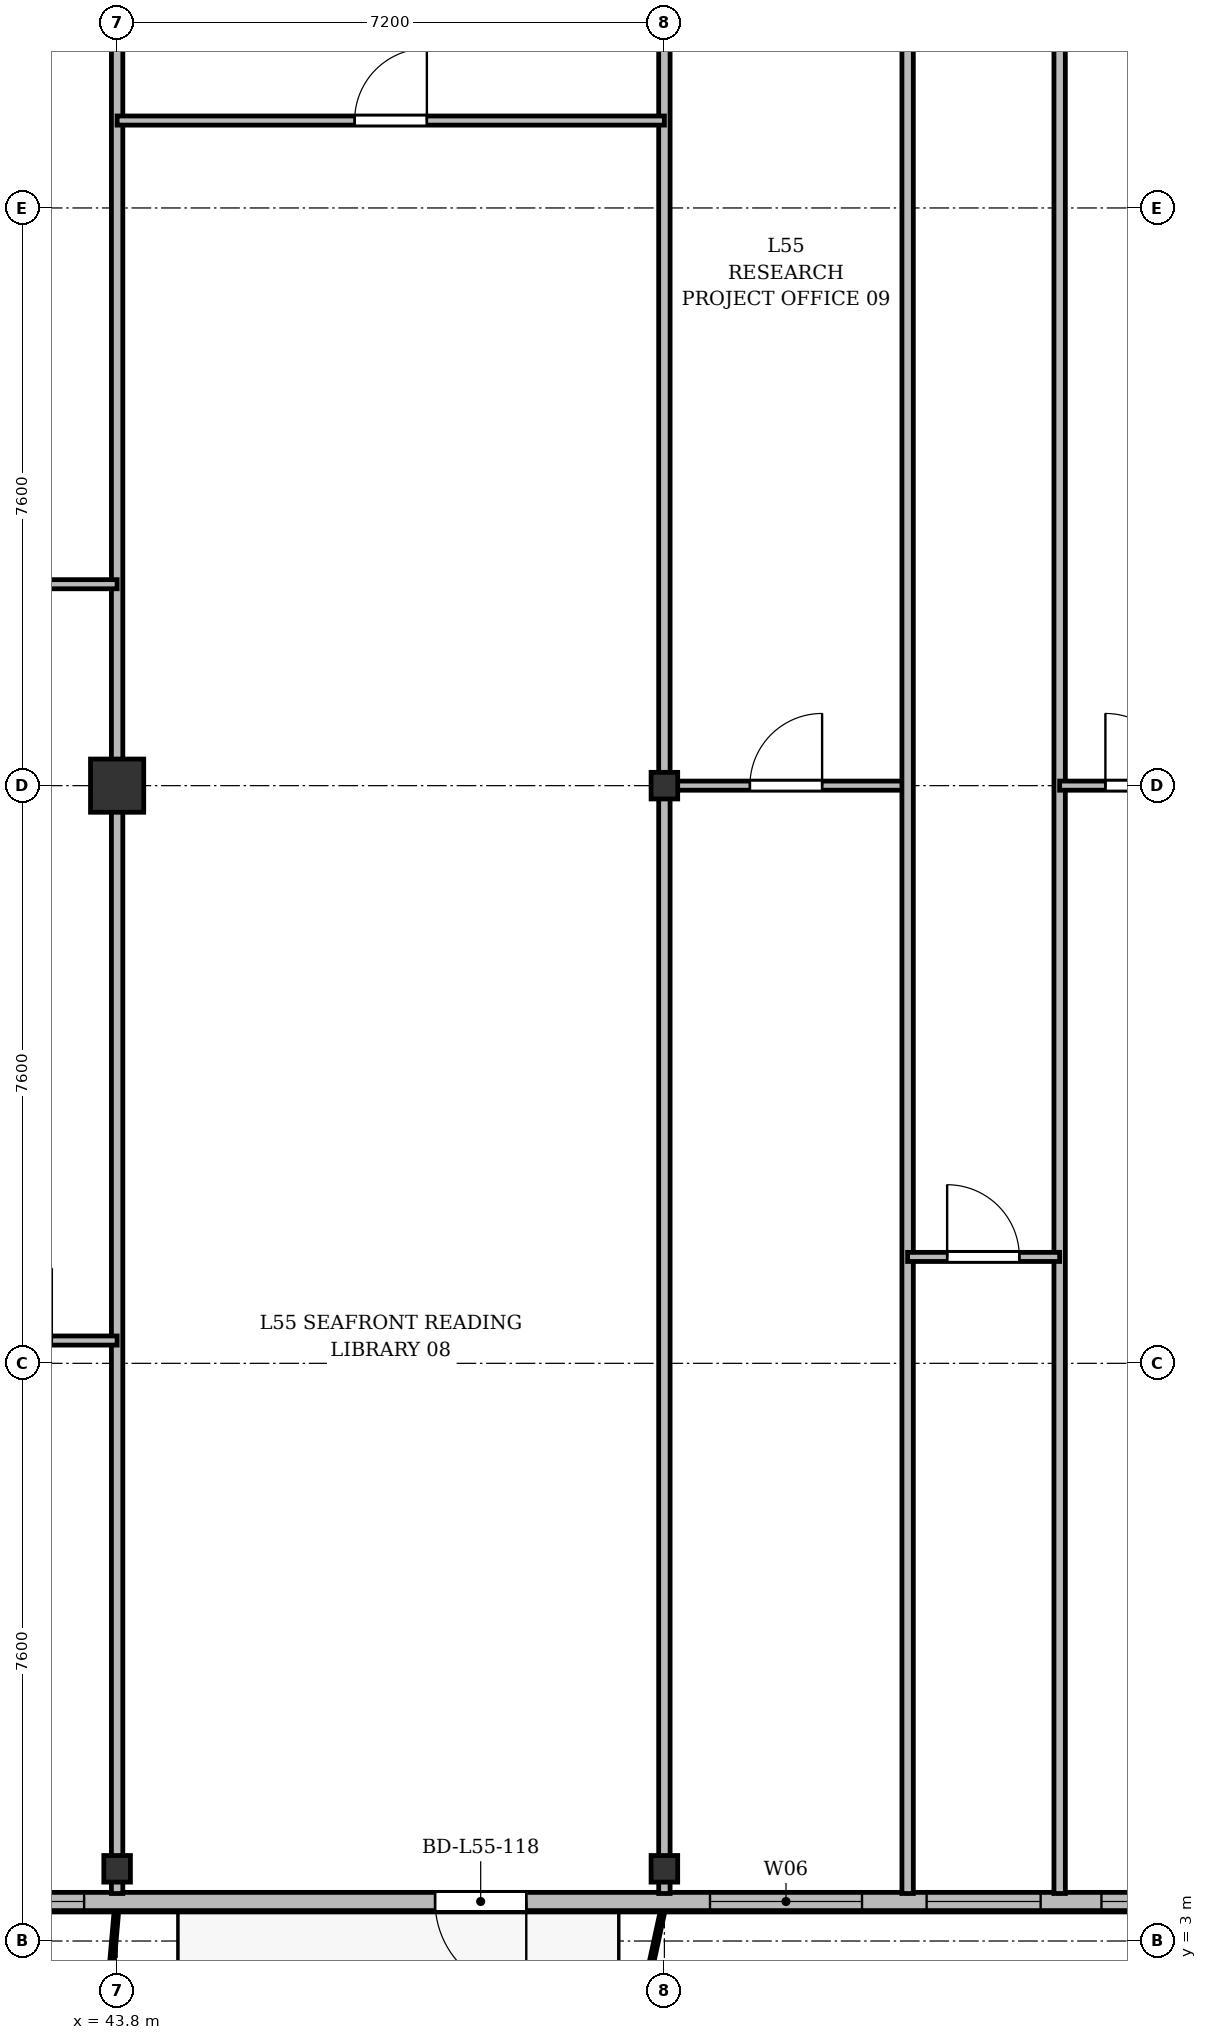
"""IFC4 building model, lengths in metres.
Left out: names, types, materials, properties, quantities, classifications, styles, units other than length and angle.
Written with IfcOpenShell. Run it as: python <this file> out.ifc"""

import sys

from ifc_helpers import new_model, si_unit, direction, frame, frame_2d, origin, origin_2d, place, context, subcontext, project, spatial, rectangle, i_section, extrude, source, transform, mapped, element, fill, save


model = new_model("IFC4")
c1 = context("Model", 3, precision=1e-05, world=origin(), true_north=direction((0.0, 1.0)))
c2 = subcontext(c1, "Body", "Model", "MODEL_VIEW")
j1 = project(units=[si_unit("LENGTHUNIT", "METRE"), si_unit("PLANEANGLEUNIT", "RADIAN")], contexts=[c1])
p1 = place(None, origin())
s1 = spatial("IfcSite", under=j1, at=p1, CompositionType="ELEMENT")
p2 = place(p1, origin())
s2 = spatial("IfcBuilding", under=s1, at=p2, CompositionType="ELEMENT")
p3 = place(p2, frame((0.0, 0.0, 212.1)))
s3 = spatial("IfcBuildingStorey", under=s2, at=p3, CompositionType="ELEMENT", Elevation=212.1)
m1 = source(origin(), c2, "Body", "SweptSolid", [
    extrude(i_section(OverallWidth=0.35, OverallDepth=0.35, WebThickness=0.018, FlangeThickness=0.028, at=origin_2d()), origin(), (0.0, 0.0, 1.0), 3.6),
])
p4 = place(p3, frame((43.8, 3.95, 0.0), z_axis=(0.0, 0.0, 1.0), x_axis=(1.0, 0.0, 0.0)))
e1 = element("IfcColumn", 1, at=p4, inside=s3, PredefinedType="COLUMN", context=c2, shape_type="MappedRepresentation", body=[
    mapped(m1, transform((0.0, 0.0, 0.0), x_axis=(1.0, 0.0, 0.0), y_axis=(0.0, 1.0, 0.0), z_axis=(0.0, 0.0, 1.0), scale=1.0)),
])
m2 = source(origin(), c2, "Body", "SweptSolid", [
    extrude(rectangle(XDim=0.7, YDim=0.7, at=origin_2d()), origin(), (0.0, 0.0, 1.0), 3.6),
])
p5 = place(p3, frame((43.8, 18.2, 0.0), z_axis=(0.0, 0.0, 1.0), x_axis=(1.0, 0.0, 0.0)))
e2 = element("IfcColumn", 2, at=p5, inside=s3, PredefinedType="COLUMN", context=c2, shape_type="MappedRepresentation", body=[
    mapped(m2, transform((0.0, 0.0, 0.0), x_axis=(1.0, 0.0, 0.0), y_axis=(0.0, 1.0, 0.0), z_axis=(0.0, 0.0, 1.0), scale=1.0)),
])
for number, where, z_axis, x_axis in (
    (3, (51.0, 3.95, 0.0), (0.0, 0.0, 1.0), (1.0, 0.0, 0.0)),
    (4, (51.0, 18.2, 0.0), (0.0, 0.0, 1.0), (1.0, 0.0, 0.0)),
):
    element("IfcColumn", number, at=place(p3, frame(where, z_axis=z_axis, x_axis=x_axis)), inside=s3, PredefinedType="COLUMN", context=c2, shape_type="MappedRepresentation", body=[
        mapped(m1, transform((0.0, 0.0, 0.0), x_axis=(1.0, 0.0, 0.0), y_axis=(0.0, 1.0, 0.0), z_axis=(0.0, 0.0, 1.0), scale=1.0)),
    ])
p6 = place(p3, frame((63.4, 3.52, 0.0), z_axis=(0.0, 0.0, 1.0), x_axis=(-1.0, 0.0, 0.0)))
e5 = element("IfcWall", 5, at=p6, inside=s3, PredefinedType="SOLIDWALL", context=c2, shape_type="SweptSolid", body=[
    extrude(rectangle(XDim=52.4, YDim=0.24, at=frame_2d((26.2, 0.0))), origin(), (0.0, 0.0, 1.0), 3.36),
])
p7 = place(p6, frame((1.445, 0.0, 0.9)))
e6 = element("IfcOpeningElement", 6, at=p7, cuts=e5, PredefinedType="OPENING", context=c2, shape_type="SweptSolid", body=[
    extrude(rectangle(XDim=1.8, YDim=1.8, at=frame_2d((0.9, 0.9))), frame((0.0, 0.13, 0.0), z_axis=(0.0, -1.0, 0.0), x_axis=(1.0, 0.0, 0.0)), (0.0, 0.0, 1.0), 0.26),
])
p8 = place(p6, frame((5.15, 0.0, 0.9)))
e7 = element("IfcOpeningElement", 7, at=p8, cuts=e5, PredefinedType="OPENING", context=c2, shape_type="SweptSolid", body=[
    extrude(rectangle(XDim=1.5, YDim=1.75, at=frame_2d((0.75, 0.875))), frame((0.0, 0.13, 0.0), z_axis=(0.0, -1.0, 0.0), x_axis=(1.0, 0.0, 0.0)), (0.0, 0.0, 1.0), 0.26),
])
p9 = place(p6, frame((7.45, 0.0, 0.9)))
e8 = element("IfcOpeningElement", 8, at=p9, cuts=e5, PredefinedType="OPENING", context=c2, shape_type="SweptSolid", body=[
    extrude(rectangle(XDim=1.5, YDim=1.75, at=frame_2d((0.75, 0.875))), frame((0.0, 0.13, 0.0), z_axis=(0.0, -1.0, 0.0), x_axis=(1.0, 0.0, 0.0)), (0.0, 0.0, 1.0), 0.26),
])
p10 = place(p6, frame((9.8, 0.0, 0.9)))
e9 = element("IfcOpeningElement", 9, at=p10, cuts=e5, PredefinedType="OPENING", context=c2, shape_type="SweptSolid", body=[
    extrude(rectangle(XDim=2.0, YDim=1.95, at=frame_2d((1.0, 0.975))), frame((0.0, 0.13, 0.0), z_axis=(0.0, -1.0, 0.0), x_axis=(1.0, 0.0, 0.0)), (0.0, 0.0, 1.0), 0.26),
])
p11 = place(p6, frame((14.217, 0.0, 0.0)))
e10 = element("IfcOpeningElement", 10, at=p11, cuts=e5, PredefinedType="OPENING", context=c2, shape_type="SweptSolid", body=[
    extrude(rectangle(XDim=1.2, YDim=2.2, at=frame_2d((0.6, 1.1))), frame((0.0, 0.13, 0.0), z_axis=(0.0, -1.0, 0.0), x_axis=(1.0, 0.0, 0.0)), (0.0, 0.0, 1.0), 0.26),
])
p12 = place(p6, frame((20.034, 0.0, 0.9)))
e11 = element("IfcOpeningElement", 11, at=p12, cuts=e5, PredefinedType="OPENING", context=c2, shape_type="SweptSolid", body=[
    extrude(rectangle(XDim=1.8, YDim=1.8, at=frame_2d((0.9, 0.9))), frame((0.0, 0.13, 0.0), z_axis=(0.0, -1.0, 0.0), x_axis=(1.0, 0.0, 0.0)), (0.0, 0.0, 1.0), 0.26),
])
p13 = place(p6, frame((22.5, 0.0, 0.9)))
e12 = element("IfcOpeningElement", 12, at=p13, cuts=e5, PredefinedType="OPENING", context=c2, shape_type="SweptSolid", body=[
    extrude(rectangle(XDim=2.2, YDim=1.8, at=frame_2d((1.1, 0.9))), frame((0.0, 0.13, 0.0), z_axis=(0.0, -1.0, 0.0), x_axis=(1.0, 0.0, 0.0)), (0.0, 0.0, 1.0), 0.26),
])
p14 = place(p6, frame((25.517, 0.0, 0.9)))
e13 = element("IfcOpeningElement", 13, at=p14, cuts=e5, PredefinedType="OPENING", context=c2, shape_type="SweptSolid", body=[
    extrude(rectangle(XDim=1.5, YDim=1.75, at=frame_2d((0.75, 0.875))), frame((0.0, 0.13, 0.0), z_axis=(0.0, -1.0, 0.0), x_axis=(1.0, 0.0, 0.0)), (0.0, 0.0, 1.0), 0.26),
])
p15 = place(p6, frame((29.2, 0.0, 0.9)))
e14 = element("IfcOpeningElement", 14, at=p15, cuts=e5, PredefinedType="OPENING", context=c2, shape_type="SweptSolid", body=[
    extrude(rectangle(XDim=2.0, YDim=1.95, at=frame_2d((1.0, 0.975))), frame((0.0, 0.13, 0.0), z_axis=(0.0, -1.0, 0.0), x_axis=(1.0, 0.0, 0.0)), (0.0, 0.0, 1.0), 0.26),
])
p16 = place(p6, frame((33.175, 0.0, 0.9)))
e15 = element("IfcOpeningElement", 15, at=p16, cuts=e5, PredefinedType="OPENING", context=c2, shape_type="SweptSolid", body=[
    extrude(rectangle(XDim=1.65, YDim=1.85, at=frame_2d((0.825, 0.925))), frame((0.0, 0.13, 0.0), z_axis=(0.0, -1.0, 0.0), x_axis=(1.0, 0.0, 0.0)), (0.0, 0.0, 1.0), 0.26),
])
p17 = place(p6, frame((35.5, 0.0, 0.9)))
e16 = element("IfcOpeningElement", 16, at=p17, cuts=e5, PredefinedType="OPENING", context=c2, shape_type="SweptSolid", body=[
    extrude(rectangle(XDim=1.8, YDim=1.8, at=frame_2d((0.9, 0.9))), frame((0.0, 0.13, 0.0), z_axis=(0.0, -1.0, 0.0), x_axis=(1.0, 0.0, 0.0)), (0.0, 0.0, 1.0), 0.26),
])
p18 = place(p6, frame((38.05, 0.0, 0.9)))
e17 = element("IfcOpeningElement", 17, at=p18, cuts=e5, PredefinedType="OPENING", context=c2, shape_type="SweptSolid", body=[
    extrude(rectangle(XDim=1.5, YDim=1.75, at=frame_2d((0.75, 0.875))), frame((0.0, 0.13, 0.0), z_axis=(0.0, -1.0, 0.0), x_axis=(1.0, 0.0, 0.0)), (0.0, 0.0, 1.0), 0.26),
])
p19 = place(p6, frame((41.456, 0.0, 0.0)))
e18 = element("IfcOpeningElement", 18, at=p19, cuts=e5, PredefinedType="OPENING", context=c2, shape_type="SweptSolid", body=[
    extrude(rectangle(XDim=1.2, YDim=2.2, at=frame_2d((0.6, 1.1))), frame((0.0, 0.13, 0.0), z_axis=(0.0, -1.0, 0.0), x_axis=(1.0, 0.0, 0.0)), (0.0, 0.0, 1.0), 0.26),
])
p20 = place(p6, frame((43.45, 0.0, 0.9)))
e19 = element("IfcOpeningElement", 19, at=p20, cuts=e5, PredefinedType="OPENING", context=c2, shape_type="SweptSolid", body=[
    extrude(rectangle(XDim=1.5, YDim=1.75, at=frame_2d((0.75, 0.875))), frame((0.0, 0.13, 0.0), z_axis=(0.0, -1.0, 0.0), x_axis=(1.0, 0.0, 0.0)), (0.0, 0.0, 1.0), 0.26),
])
p21 = place(p6, frame((45.675, 0.0, 0.9)))
e20 = element("IfcOpeningElement", 20, at=p21, cuts=e5, PredefinedType="OPENING", context=c2, shape_type="SweptSolid", body=[
    extrude(rectangle(XDim=1.65, YDim=1.85, at=frame_2d((0.825, 0.925))), frame((0.0, 0.13, 0.0), z_axis=(0.0, -1.0, 0.0), x_axis=(1.0, 0.0, 0.0)), (0.0, 0.0, 1.0), 0.26),
])
p22 = place(p6, frame((49.155, 0.0, 0.9)))
e21 = element("IfcOpeningElement", 21, at=p22, cuts=e5, PredefinedType="OPENING", context=c2, shape_type="SweptSolid", body=[
    extrude(rectangle(XDim=1.8, YDim=1.8, at=frame_2d((0.9, 0.9))), frame((0.0, 0.13, 0.0), z_axis=(0.0, -1.0, 0.0), x_axis=(1.0, 0.0, 0.0)), (0.0, 0.0, 1.0), 0.26),
])
for number, where, z_axis, x_axis in (
    (22, (43.8, 3.625, 0.0), (0.0, 0.0, 1.0), (0.0, 1.0, 0.0)),
    (23, (51.0, 3.625, 0.0), (0.0, 0.0, 1.0), (0.0, 1.0, 0.0)),
):
    element("IfcWall", number, at=place(p3, frame(where, z_axis=z_axis, x_axis=x_axis)), inside=s3, PredefinedType="PARTITIONING", context=c2, shape_type="SweptSolid", body=[
        extrude(rectangle(XDim=27.175, YDim=0.15, at=frame_2d((13.587, 0.0))), origin(), (0.0, 0.0, 1.0), 2.86),
    ])
p23 = place(p3, frame((35.8, 20.85, 0.0), z_axis=(0.0, 0.0, 1.0), x_axis=(1.0, 0.0, 0.0)))
e24 = element("IfcWall", 24, at=p23, inside=s3, PredefinedType="PARTITIONING", context=c2, shape_type="SweptSolid", body=[
    extrude(rectangle(XDim=8.0, YDim=0.12, at=frame_2d((4.0, 0.0))), origin(), (0.0, 0.0, 1.0), 2.86),
])
p24 = place(p23, frame((3.525, 0.0, 0.0)))
e25 = element("IfcOpeningElement", 25, at=p24, cuts=e24, PredefinedType="OPENING", context=c2, shape_type="SweptSolid", body=[
    extrude(rectangle(XDim=0.95, YDim=2.15, at=frame_2d((0.475, 1.075))), frame((0.0, 0.07, 0.0), z_axis=(0.0, -1.0, 0.0), x_axis=(1.0, 0.0, 0.0)), (0.0, 0.0, 1.0), 0.14),
])
p25 = place(p3, frame((41.133, 10.9, 0.0), z_axis=(0.0, 0.0, 1.0), x_axis=(1.0, 0.0, 0.0)))
e26 = element("IfcWall", 26, at=p25, inside=s3, PredefinedType="PARTITIONING", context=c2, shape_type="SweptSolid", body=[
    extrude(rectangle(XDim=2.667, YDim=0.12, at=frame_2d((1.333, 0.0))), origin(), (0.0, 0.0, 1.0), 2.86),
])
p26 = place(p25, frame((0.858, 0.0, 0.0)))
e27 = element("IfcOpeningElement", 27, at=p26, cuts=e26, PredefinedType="OPENING", context=c2, shape_type="SweptSolid", body=[
    extrude(rectangle(XDim=0.95, YDim=2.15, at=frame_2d((0.475, 1.075))), frame((0.0, 0.07, 0.0), z_axis=(0.0, -1.0, 0.0), x_axis=(1.0, 0.0, 0.0)), (0.0, 0.0, 1.0), 0.14),
])
p27 = place(p3, frame((43.8, 26.95, 0.0), z_axis=(0.0, 0.0, 1.0), x_axis=(1.0, 0.0, 0.0)))
e28 = element("IfcWall", 28, at=p27, inside=s3, PredefinedType="PARTITIONING", context=c2, shape_type="SweptSolid", body=[
    extrude(rectangle(XDim=7.2, YDim=0.12, at=frame_2d((3.6, 0.0))), origin(), (0.0, 0.0, 1.0), 2.86),
])
p28 = place(p27, frame((3.125, 0.0, 0.0)))
e29 = element("IfcOpeningElement", 29, at=p28, cuts=e28, PredefinedType="OPENING", context=c2, shape_type="SweptSolid", body=[
    extrude(rectangle(XDim=0.95, YDim=2.15, at=frame_2d((0.475, 1.075))), frame((0.0, 0.07, 0.0), z_axis=(0.0, -1.0, 0.0), x_axis=(1.0, 0.0, 0.0)), (0.0, 0.0, 1.0), 0.14),
])
p29 = place(p3, frame((51.0, 18.2, 0.0), z_axis=(0.0, 0.0, 1.0), x_axis=(1.0, 0.0, 0.0)))
e30 = element("IfcWall", 30, at=p29, inside=s3, PredefinedType="PARTITIONING", context=c2, shape_type="SweptSolid", body=[
    extrude(rectangle(XDim=3.2, YDim=0.12, at=frame_2d((1.6, 0.0))), origin(), (0.0, 0.0, 1.0), 2.91),
])
p30 = place(p29, frame((1.125, 0.0, 0.0)))
e31 = element("IfcOpeningElement", 31, at=p30, cuts=e30, PredefinedType="OPENING", context=c2, shape_type="SweptSolid", body=[
    extrude(rectangle(XDim=0.95, YDim=2.15, at=frame_2d((0.475, 1.075))), frame((0.0, 0.07, 0.0), z_axis=(0.0, -1.0, 0.0), x_axis=(1.0, 0.0, 0.0)), (0.0, 0.0, 1.0), 0.14),
])
for number, where, z_axis, x_axis in (
    (32, (54.2, 3.625, 0.0), (0.0, 0.0, 1.0), (0.0, 1.0, 0.0)),
    (33, (56.2, 3.625, 0.0), (0.0, 0.0, 1.0), (0.0, 1.0, 0.0)),
):
    element("IfcWall", number, at=place(p3, frame(where, z_axis=z_axis, x_axis=x_axis)), inside=s3, PredefinedType="PARTITIONING", context=c2, shape_type="SweptSolid", body=[
        extrude(rectangle(XDim=27.175, YDim=0.15, at=frame_2d((13.587, 0.0))), origin(), (0.0, 0.0, 1.0), 2.91),
    ])
p31 = place(p3, frame((54.2, 12.0, 0.0), z_axis=(0.0, 0.0, 1.0), x_axis=(1.0, 0.0, 0.0)))
e34 = element("IfcWall", 34, at=p31, inside=s3, PredefinedType="PARTITIONING", context=c2, shape_type="SweptSolid", body=[
    extrude(rectangle(XDim=2.0, YDim=0.12, at=frame_2d((1.0, 0.0))), origin(), (0.0, 0.0, 1.0), 3.36),
])
p32 = place(p31, frame((0.52, 0.0, 0.0)))
e35 = element("IfcOpeningElement", 35, at=p32, cuts=e34, PredefinedType="OPENING", context=c2, shape_type="SweptSolid", body=[
    extrude(rectangle(XDim=0.95, YDim=2.15, at=frame_2d((0.475, 1.075))), frame((0.0, 0.07, 0.0), z_axis=(0.0, -1.0, 0.0), x_axis=(1.0, 0.0, 0.0)), (0.0, 0.0, 1.0), 0.14),
])
p33 = place(p3, frame((56.2, 18.2, 0.0), z_axis=(0.0, 0.0, 1.0), x_axis=(1.0, 0.0, 0.0)))
e36 = element("IfcWall", 36, at=p33, inside=s3, PredefinedType="PARTITIONING", context=c2, shape_type="SweptSolid", body=[
    extrude(rectangle(XDim=2.6, YDim=0.12, at=frame_2d((1.3, 0.0))), origin(), (0.0, 0.0, 1.0), 2.91),
])
p34 = place(p33, frame((0.602, 0.0, 0.0)))
e37 = element("IfcOpeningElement", 37, at=p34, cuts=e36, PredefinedType="OPENING", context=c2, shape_type="SweptSolid", body=[
    extrude(rectangle(XDim=0.95, YDim=2.15, at=frame_2d((0.475, 1.075))), frame((0.0, 0.07, 0.0), z_axis=(0.0, -1.0, 0.0), x_axis=(1.0, 0.0, 0.0)), (0.0, 0.0, 1.0), 0.14),
])
m3 = source(origin(), c2, "Body", "SweptSolid", [
    extrude(rectangle(XDim=1.5, YDim=1.75, at=frame_2d((0.75, 0.875))), frame((0.0, 0.03, 0.0), z_axis=(0.0, -1.0, 0.0), x_axis=(1.0, 0.0, 0.0)), (0.0, 0.0, 1.0), 0.06),
])
p35 = place(p8, origin())
e38 = element("IfcWindow", 38, at=p35, inside=s3, PartitioningType="SINGLE_PANEL", PredefinedType="WINDOW", context=c2, shape_type="MappedRepresentation", body=[
    mapped(m3, transform((0.0, 0.0, 0.0), x_axis=(1.0, 0.0, 0.0), y_axis=(0.0, 1.0, 0.0), z_axis=(0.0, 0.0, 1.0), scale=1.0)),
])
fill(e7, e38)
p36 = place(p9, origin())
e39 = element("IfcWindow", 39, at=p36, inside=s3, PartitioningType="SINGLE_PANEL", PredefinedType="WINDOW", context=c2, shape_type="MappedRepresentation", body=[
    mapped(m3, transform((0.0, 0.0, 0.0), x_axis=(1.0, 0.0, 0.0), y_axis=(0.0, 1.0, 0.0), z_axis=(0.0, 0.0, 1.0), scale=1.0)),
])
fill(e8, e39)
m4 = source(origin(), c2, "Body", "SweptSolid", [
    extrude(rectangle(XDim=2.0, YDim=1.95, at=frame_2d((1.0, 0.975))), frame((0.0, 0.03, 0.0), z_axis=(0.0, -1.0, 0.0), x_axis=(1.0, 0.0, 0.0)), (0.0, 0.0, 1.0), 0.06),
])
p37 = place(p10, origin())
e40 = element("IfcWindow", 40, at=p37, inside=s3, PartitioningType="SINGLE_PANEL", PredefinedType="WINDOW", context=c2, shape_type="MappedRepresentation", body=[
    mapped(m4, transform((0.0, 0.0, 0.0), x_axis=(1.0, 0.0, 0.0), y_axis=(0.0, 1.0, 0.0), z_axis=(0.0, 0.0, 1.0), scale=1.0)),
])
fill(e9, e40)
m5 = source(origin(), c2, "Body", "SweptSolid", [
    extrude(rectangle(XDim=1.2, YDim=2.2, at=frame_2d((0.6, 1.1))), frame((0.0, 0.025, 0.0), z_axis=(0.0, -1.0, 0.0), x_axis=(1.0, 0.0, 0.0)), (0.0, 0.0, 1.0), 0.05),
])
p38 = place(p11, origin())
e41 = element("IfcDoor", 41, at=p38, inside=s3, OperationType="SINGLE_SWING_LEFT", PredefinedType="DOOR", context=c2, shape_type="MappedRepresentation", body=[
    mapped(m5, transform((0.0, 0.0, 0.0), x_axis=(1.0, 0.0, 0.0), y_axis=(0.0, 1.0, 0.0), z_axis=(0.0, 0.0, 1.0), scale=1.0)),
])
fill(e10, e41)
m6 = source(origin(), c2, "Body", "SweptSolid", [
    extrude(rectangle(XDim=1.8, YDim=1.8, at=frame_2d((0.9, 0.9))), frame((0.0, 0.03, 0.0), z_axis=(0.0, -1.0, 0.0), x_axis=(1.0, 0.0, 0.0)), (0.0, 0.0, 1.0), 0.06),
])
p39 = place(p12, origin())
e42 = element("IfcWindow", 42, at=p39, inside=s3, PartitioningType="SINGLE_PANEL", PredefinedType="WINDOW", context=c2, shape_type="MappedRepresentation", body=[
    mapped(m6, transform((0.0, 0.0, 0.0), x_axis=(1.0, 0.0, 0.0), y_axis=(0.0, 1.0, 0.0), z_axis=(0.0, 0.0, 1.0), scale=1.0)),
])
fill(e11, e42)
m7 = source(origin(), c2, "Body", "SweptSolid", [
    extrude(rectangle(XDim=0.95, YDim=2.15, at=frame_2d((0.475, 1.075))), frame((0.0, 0.025, 0.0), z_axis=(0.0, -1.0, 0.0), x_axis=(1.0, 0.0, 0.0)), (0.0, 0.0, 1.0), 0.05),
])
p40 = place(p28, origin())
e43 = element("IfcDoor", 43, at=p40, inside=s3, OperationType="SINGLE_SWING_RIGHT", PredefinedType="DOOR", context=c2, shape_type="MappedRepresentation", body=[
    mapped(m7, transform((0.0, 0.0, 0.0), x_axis=(1.0, 0.0, 0.0), y_axis=(0.0, 1.0, 0.0), z_axis=(0.0, 0.0, 1.0), scale=1.0)),
])
fill(e29, e43)
p41 = place(p30, origin())
e44 = element("IfcDoor", 44, at=p41, inside=s3, OperationType="SINGLE_SWING_RIGHT", PredefinedType="DOOR", context=c2, shape_type="MappedRepresentation", body=[
    mapped(m7, transform((0.0, 0.0, 0.0), x_axis=(1.0, 0.0, 0.0), y_axis=(0.0, 1.0, 0.0), z_axis=(0.0, 0.0, 1.0), scale=1.0)),
])
fill(e31, e44)
p42 = place(p32, origin())
e45 = element("IfcDoor", 45, at=p42, inside=s3, OperationType="SINGLE_SWING_LEFT", PredefinedType="DOOR", context=c2, shape_type="MappedRepresentation", body=[
    mapped(m7, transform((0.0, 0.0, 0.0), x_axis=(1.0, 0.0, 0.0), y_axis=(0.0, 1.0, 0.0), z_axis=(0.0, 0.0, 1.0), scale=1.0)),
])
fill(e35, e45)
p43 = place(p34, origin())
e46 = element("IfcDoor", 46, at=p43, inside=s3, OperationType="SINGLE_SWING_LEFT", PredefinedType="DOOR", context=c2, shape_type="MappedRepresentation", body=[
    mapped(m7, transform((0.0, 0.0, 0.0), x_axis=(1.0, 0.0, 0.0), y_axis=(0.0, 1.0, 0.0), z_axis=(0.0, 0.0, 1.0), scale=1.0)),
])
fill(e37, e46)
save(model, sys.argv[1])
